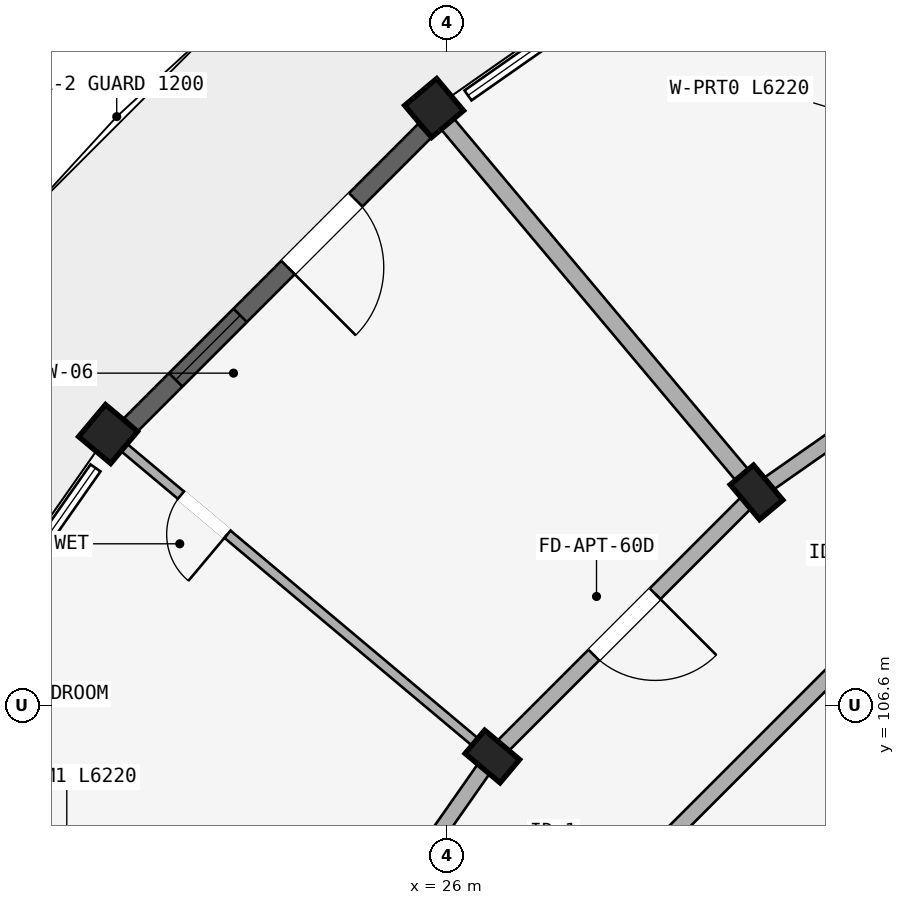
"""IFC4 building model, lengths in metres.
Left out: names, types, materials, properties, quantities, classifications, styles, units other than length and angle.
Written with IfcOpenShell. Run it as: python <this file> out.ifc"""

import sys

from ifc_helpers import new_model, si_unit, direction, frame, frame_2d, origin, origin_2d, place, context, subcontext, project, spatial, rectangle, extrude, element, fill, save


model = new_model("IFC4")
c1 = context("Model", 3, precision=1e-05, world=origin(), true_north=direction((0.0, 1.0)))
c2 = subcontext(c1, "Body", "Model", "MODEL_VIEW")
j1 = project(units=[si_unit("LENGTHUNIT", "METRE"), si_unit("PLANEANGLEUNIT", "RADIAN")], contexts=[c1])
p1 = place(None, origin())
s1 = spatial("IfcSite", under=j1, at=p1, CompositionType="ELEMENT")
p2 = place(p1, origin())
s2 = spatial("IfcBuilding", under=s1, at=p2, CompositionType="ELEMENT")
p3 = place(p2, frame((0.0, 0.0, 49.65)))
s3 = spatial("IfcBuildingStorey", under=s2, at=p3, CompositionType="ELEMENT", Elevation=49.65)
p4 = place(p3, frame((30.073, 109.402, 0.0), z_axis=(0.0, 0.0, 1.0), x_axis=(0.766044443119, 0.642787609687, 0.0)))
e1 = element("IfcColumn", 1, at=p4, inside=s3, PredefinedType="COLUMN", context=c2, shape_type="SweptSolid", body=[
    extrude(rectangle(XDim=0.4, YDim=0.6, at=origin_2d()), origin(), (0.0, 0.0, 1.0), 2.91),
])
p5 = place(p3, frame((25.831, 114.458, 0.0), z_axis=(0.0, 0.0, 1.0), x_axis=(0.766044443119, 0.642787609687, 0.0)))
e2 = element("IfcColumn", 2, at=p5, inside=s3, PredefinedType="COLUMN", context=c2, shape_type="SweptSolid", body=[
    extrude(rectangle(XDim=0.55, YDim=0.55, at=origin_2d()), origin(), (0.0, 0.0, 1.0), 2.91),
])
p6 = place(p3, frame((26.598, 105.927, 0.0), z_axis=(0.0, 0.0, 1.0), x_axis=(0.642787609687, 0.766044443119, 0.0)))
e3 = element("IfcColumn", 3, at=p6, inside=s3, PredefinedType="COLUMN", context=c2, shape_type="SweptSolid", body=[
    extrude(rectangle(XDim=0.4, YDim=0.6, at=origin_2d()), origin(), (0.0, 0.0, 1.0), 2.91),
])
p7 = place(p3, frame((21.542, 110.169, 0.0), z_axis=(0.0, 0.0, 1.0), x_axis=(0.642787609687, 0.766044443119, 0.0)))
e4 = element("IfcColumn", 4, at=p7, inside=s3, PredefinedType="COLUMN", context=c2, shape_type="SweptSolid", body=[
    extrude(rectangle(XDim=0.55, YDim=0.55, at=origin_2d()), origin(), (0.0, 0.0, 1.0), 2.91),
])
p8 = place(p3, frame((34.1, 112.222, 0.0), z_axis=(0.0, 0.0, 1.0), x_axis=(-0.819140911474, -0.573592335331, 0.0)))
e5 = element("IfcWall", 5, at=p8, inside=s3, PredefinedType="STANDARD", context=c2, shape_type="SweptSolid", body=[
    extrude(rectangle(XDim=4.916, YDim=0.2, at=frame_2d((2.458, 0.0))), origin(), (0.0, 0.0, 1.0), 2.352),
])
p9 = place(p3, frame((31.616, 107.564, 0.0), z_axis=(0.0, 0.0, 1.0), x_axis=(-0.707106781187, -0.707106781187, 0.0)))
e6 = element("IfcWall", 6, at=p9, inside=s3, PredefinedType="STANDARD", context=c2, shape_type="SweptSolid", body=[
    extrude(rectangle(XDim=4.497, YDim=0.2, at=frame_2d((2.249, 0.0))), origin(), (0.0, 0.0, 1.0), 2.352),
])
p10 = place(p3, frame((30.073, 109.402, 0.0), z_axis=(0.0, 0.0, 1.0), x_axis=(-0.707106781187, -0.707106781187, 0.0)))
e7 = element("IfcWall", 7, at=p10, inside=s3, PredefinedType="STANDARD", context=c2, shape_type="SweptSolid", body=[
    extrude(rectangle(XDim=4.916, YDim=0.2, at=frame_2d((2.458, 0.0))), origin(), (0.0, 0.0, 1.0), 2.352),
])
p11 = place(p10, frame((1.888, 0.0, 0.0)))
e8 = element("IfcOpeningElement", 8, at=p11, cuts=e7, PredefinedType="OPENING", context=c2, shape_type="SweptSolid", body=[
    extrude(rectangle(XDim=1.14, YDim=2.15, at=frame_2d((0.57, 1.075))), frame((0.0, 0.11, 0.0), z_axis=(0.0, -1.0, 0.0), x_axis=(1.0, 0.0, 0.0)), (0.0, 0.0, 1.0), 0.22),
])
p12 = place(p3, frame((26.598, 105.927, 0.0), z_axis=(0.0, 0.0, 1.0), x_axis=(-0.573592335331, -0.819140911474, 0.0)))
e9 = element("IfcWall", 9, at=p12, inside=s3, PredefinedType="STANDARD", context=c2, shape_type="SweptSolid", body=[
    extrude(rectangle(XDim=4.916, YDim=0.2, at=frame_2d((2.458, 0.0))), origin(), (0.0, 0.0, 1.0), 2.352),
])
p13 = place(p3, frame((34.05, 112.309, 0.0), z_axis=(0.0, 0.0, 1.0), x_axis=(-0.500010116563, 0.866019562905, 0.0)))
e10 = element("IfcWall", 10, at=p13, inside=s3, PredefinedType="PARTITIONING", context=c2, shape_type="SweptSolid", body=[
    extrude(rectangle(XDim=6.22, YDim=0.125, at=frame_2d((3.11, 0.0))), origin(), (0.0, 0.0, 1.0), 2.352),
])
p14 = place(p13, frame((4.45, 0.0, 0.0)))
e11 = element("IfcOpeningElement", 11, at=p14, cuts=e10, PredefinedType="OPENING", context=c2, shape_type="SweptSolid", body=[
    extrude(rectangle(XDim=0.8, YDim=2.1, at=frame_2d((0.4, 1.05))), frame((0.0, 0.073, 0.0), z_axis=(0.0, -1.0, 0.0), x_axis=(1.0, 0.0, 0.0)), (0.0, 0.0, 1.0), 0.145),
])
p15 = place(p3, frame((30.009, 109.479, 0.0), z_axis=(0.0, 0.0, 1.0), x_axis=(-0.642771313427, 0.766058117009, 0.0)))
e12 = element("IfcWall", 12, at=p15, inside=s3, PredefinedType="STANDARD", context=c2, shape_type="SweptSolid", body=[
    extrude(rectangle(XDim=6.22, YDim=0.22, at=frame_2d((3.11, 0.0))), origin(), (0.0, 0.0, 1.0), 2.352),
])
p16 = place(p3, frame((26.521, 105.991, 0.0), z_axis=(0.0, 0.0, 1.0), x_axis=(-0.766058117009, 0.642771313427, 0.0)))
e13 = element("IfcWall", 13, at=p16, inside=s3, PredefinedType="PARTITIONING", context=c2, shape_type="SweptSolid", body=[
    extrude(rectangle(XDim=6.22, YDim=0.125, at=frame_2d((3.11, 0.0))), origin(), (0.0, 0.0, 1.0), 2.352),
])
p17 = place(p16, frame((4.45, 0.0, 0.0)))
e14 = element("IfcOpeningElement", 14, at=p17, cuts=e13, PredefinedType="OPENING", context=c2, shape_type="SweptSolid", body=[
    extrude(rectangle(XDim=0.8, YDim=2.1, at=frame_2d((0.4, 1.05))), frame((0.0, 0.073, 0.0), z_axis=(0.0, -1.0, 0.0), x_axis=(1.0, 0.0, 0.0)), (0.0, 0.0, 1.0), 0.145),
])
p18 = place(p3, frame((23.691, 101.95, 0.0), z_axis=(0.0, 0.0, 1.0), x_axis=(-0.866019562905, 0.500010116563, 0.0)))
e15 = element("IfcWall", 15, at=p18, inside=s3, PredefinedType="STANDARD", context=c2, shape_type="SweptSolid", body=[
    extrude(rectangle(XDim=6.22, YDim=0.22, at=frame_2d((3.11, 0.0))), origin(), (0.0, 0.0, 1.0), 2.352),
])
p19 = place(p3, frame((25.707, 114.157, 0.0), z_axis=(0.0, 0.0, 1.0), x_axis=(-0.707106781187, -0.707106781187, 0.0)))
e16 = element("IfcWall", 16, at=p19, inside=s3, PredefinedType="STANDARD", context=c2, shape_type="SweptSolid", body=[
    extrude(rectangle(XDim=5.465, YDim=0.25, at=frame_2d((2.732, 0.0))), origin(), (0.0, 0.0, 1.0), 2.352),
])
p20 = place(p19, frame((3.432, 0.0, 0.402)))
e17 = element("IfcOpeningElement", 17, at=p20, cuts=e16, PredefinedType="OPENING", context=c2, shape_type="SweptSolid", body=[
    extrude(rectangle(XDim=1.2, YDim=1.5, at=frame_2d((0.6, 0.75))), frame((0.0, 0.135, 0.0), z_axis=(0.0, -1.0, 0.0), x_axis=(1.0, 0.0, 0.0)), (0.0, 0.0, 1.0), 0.27),
])
p21 = place(p19, frame((1.283, 0.0, 0.0)))
e18 = element("IfcOpeningElement", 18, at=p21, cuts=e16, PredefinedType="OPENING", context=c2, shape_type="SweptSolid", body=[
    extrude(rectangle(XDim=1.26, YDim=2.15, at=frame_2d((0.63, 1.075))), frame((0.0, 0.135, 0.0), z_axis=(0.0, -1.0, 0.0), x_axis=(1.0, 0.0, 0.0)), (0.0, 0.0, 1.0), 0.27),
])
p22 = place(p20, origin())
e19 = element("IfcWindow", 19, at=p22, inside=s3, PartitioningType="SINGLE_PANEL", PredefinedType="WINDOW", context=c2, shape_type="SweptSolid", body=[
    extrude(rectangle(XDim=1.2, YDim=1.5, at=frame_2d((0.6, 0.75))), frame((0.0, 0.03, 0.0), z_axis=(0.0, -1.0, 0.0), x_axis=(1.0, 0.0, 0.0)), (0.0, 0.0, 1.0), 0.06),
])
fill(e17, e19)
p23 = place(p17, frame((0.8, 0.0, 0.0), z_axis=(0.0, 0.0, 1.0), x_axis=(-1.0, 0.0, 0.0)))
e20 = element("IfcDoor", 20, at=p23, inside=s3, OperationType="SINGLE_SWING_RIGHT", PredefinedType="DOOR", context=c2, shape_type="SweptSolid", body=[
    extrude(rectangle(XDim=0.8, YDim=2.1, at=frame_2d((0.4, 1.05))), frame((0.0, 0.025, 0.0), z_axis=(0.0, -1.0, 0.0), x_axis=(1.0, 0.0, 0.0)), (0.0, 0.0, 1.0), 0.05),
])
fill(e14, e20)
p24 = place(p11, origin())
e21 = element("IfcDoor", 21, at=p24, inside=s3, OperationType="SINGLE_SWING_LEFT", PredefinedType="DOOR", context=c2, shape_type="SweptSolid", body=[
    extrude(rectangle(XDim=1.14, YDim=2.15, at=frame_2d((0.57, 1.075))), frame((0.0, 0.025, 0.0), z_axis=(0.0, -1.0, 0.0), x_axis=(1.0, 0.0, 0.0)), (0.0, 0.0, 1.0), 0.05),
])
fill(e8, e21)
p25 = place(p21, frame((1.26, 0.0, 0.0), z_axis=(0.0, 0.0, 1.0), x_axis=(-1.0, 0.0, 0.0)))
e22 = element("IfcDoor", 22, at=p25, inside=s3, OperationType="SINGLE_SWING_LEFT", PredefinedType="DOOR", context=c2, shape_type="SweptSolid", body=[
    extrude(rectangle(XDim=1.26, YDim=2.15, at=frame_2d((0.63, 1.075))), frame((0.0, 0.025, 0.0), z_axis=(0.0, -1.0, 0.0), x_axis=(1.0, 0.0, 0.0)), (0.0, 0.0, 1.0), 0.05),
])
fill(e18, e22)
save(model, sys.argv[1])
